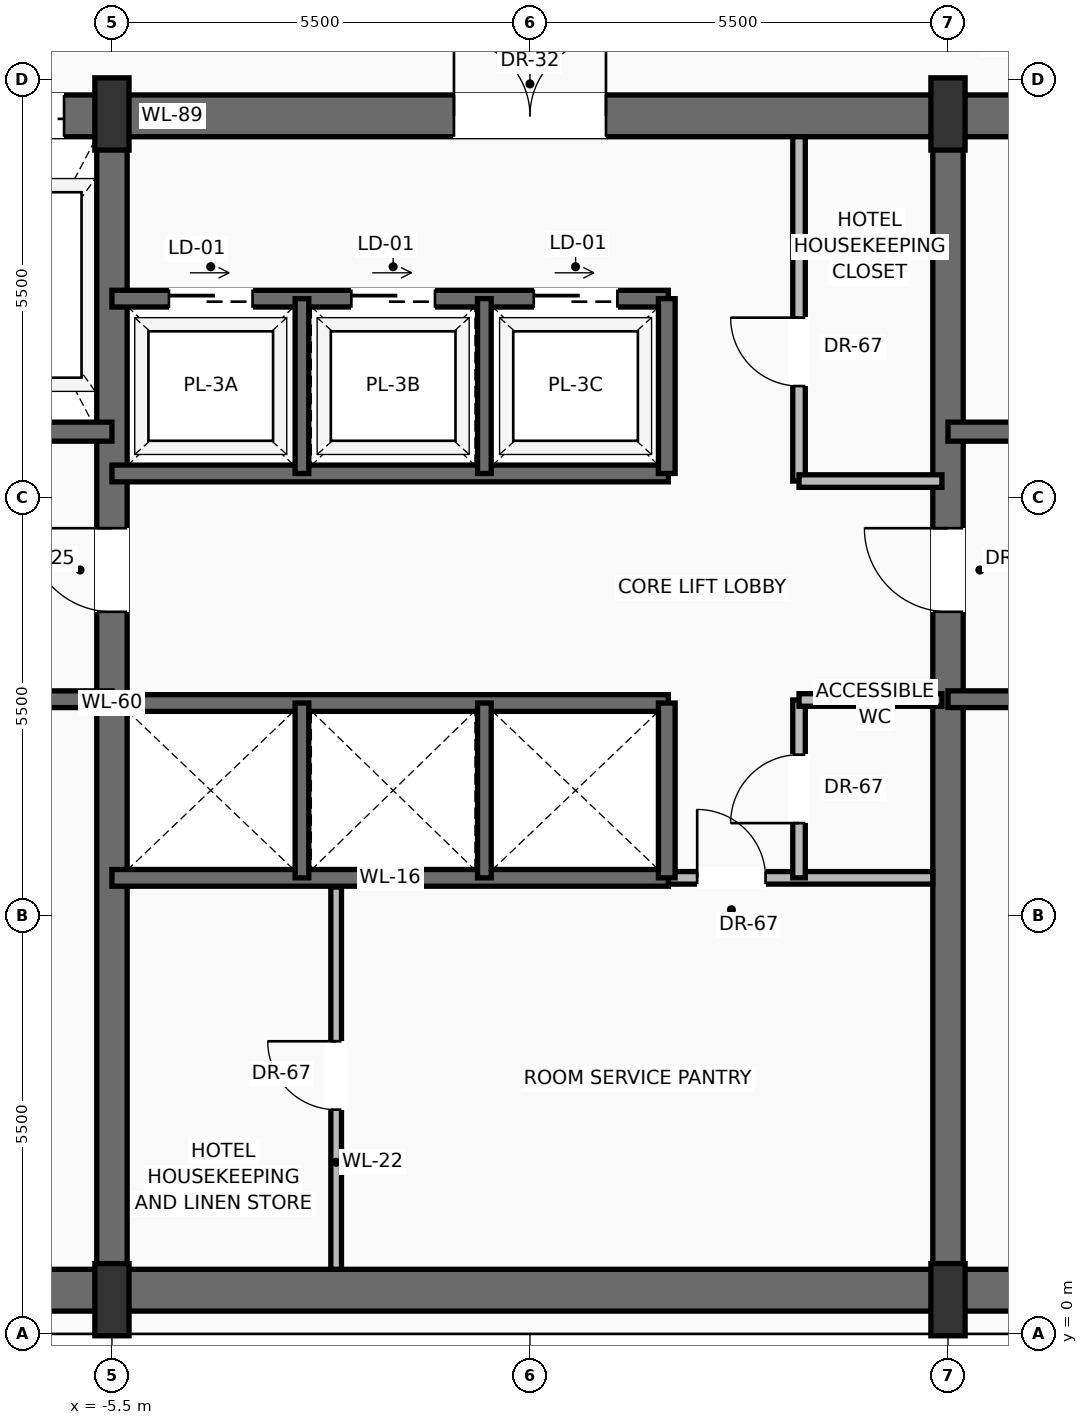
"""IFC4 building model, lengths in metres.
Left out: names, types, materials, properties, quantities, classifications, styles, units other than length and angle.
Written with IfcOpenShell. Run it as: python <this file> out.ifc"""

import sys

from ifc_helpers import new_model, si_unit, direction, frame, frame_2d, origin, origin_2d, place, context, subcontext, project, spatial, rectangle, extrude, source, transform, mapped, element, fill, save


model = new_model("IFC4")
c1 = context("Model", 3, precision=1e-05, world=origin(), true_north=direction((0.0, 1.0)))
c2 = subcontext(c1, "Body", "Model", "MODEL_VIEW")
j1 = project(units=[si_unit("LENGTHUNIT", "METRE"), si_unit("PLANEANGLEUNIT", "RADIAN")], contexts=[c1])
p1 = place(None, origin())
s1 = spatial("IfcSite", under=j1, at=p1, CompositionType="ELEMENT")
p2 = place(p1, origin())
s2 = spatial("IfcBuilding", under=s1, at=p2, CompositionType="ELEMENT")
p3 = place(p2, frame((0.0, 0.0, 220.0)))
s3 = spatial("IfcBuildingStorey", under=s2, at=p3, CompositionType="ELEMENT", Elevation=220.0)
p4 = place(p3, frame((-10.65, 0.575, 0.0), z_axis=(0.0, 0.0, 1.0), x_axis=(1.0, 0.0, 0.0)))
e1 = element("IfcWall", 1, at=p4, inside=s3, PredefinedType="SHEAR", context=c2, shape_type="SweptSolid", body=[
    extrude(rectangle(XDim=21.3, YDim=0.55, at=frame_2d((10.65, 0.0))), origin(), (0.0, 0.0, 1.0), 3.24),
])
p5 = place(p3, frame((-10.7, 16.025, 0.0), z_axis=(0.0, 0.0, 1.0), x_axis=(1.0, 0.0, 0.0)))
e2 = element("IfcWall", 2, at=p5, inside=s3, PredefinedType="SHEAR", context=c2, shape_type="SweptSolid", body=[
    extrude(rectangle(XDim=21.4, YDim=0.55, at=frame_2d((10.7, 0.0))), origin(), (0.0, 0.0, 1.0), 3.24),
])
p6 = place(p5, frame((3.27, 0.0, 0.0)))
e3 = element("IfcOpeningElement", 3, at=p6, cuts=e2, PredefinedType="OPENING", context=c2, shape_type="SweptSolid", body=[
    extrude(rectangle(XDim=1.3, YDim=2.3, at=frame_2d((0.65, 1.15))), frame((0.0, 0.285, 0.0), z_axis=(0.0, -1.0, 0.0), x_axis=(1.0, 0.0, 0.0)), (0.0, 0.0, 1.0), 0.57),
])
p7 = place(p5, frame((9.7, 0.0, 0.0)))
e4 = element("IfcOpeningElement", 4, at=p7, cuts=e2, PredefinedType="OPENING", context=c2, shape_type="SweptSolid", body=[
    extrude(rectangle(XDim=2.0, YDim=2.4, at=frame_2d((1.0, 1.2))), frame((0.0, 0.285, 0.0), z_axis=(0.0, -1.0, 0.0), x_axis=(1.0, 0.0, 0.0)), (0.0, 0.0, 1.0), 0.57),
])
p8 = place(p3, frame((-5.5, 0.575, 0.0), z_axis=(0.0, 0.0, 1.0), x_axis=(0.0, 1.0, 0.0)))
e5 = element("IfcWall", 5, at=p8, inside=s3, PredefinedType="SHEAR", context=c2, shape_type="SweptSolid", body=[
    extrude(rectangle(XDim=15.45, YDim=0.4, at=frame_2d((7.725, 0.0))), origin(), (0.0, 0.0, 1.0), 3.24),
])
p9 = place(p8, frame((8.925, 0.0, 0.0)))
e6 = element("IfcOpeningElement", 6, at=p9, cuts=e5, PredefinedType="OPENING", context=c2, shape_type="SweptSolid", body=[
    extrude(rectangle(XDim=1.1, YDim=2.2, at=frame_2d((0.55, 1.1))), frame((0.0, 0.21, 0.0), z_axis=(0.0, -1.0, 0.0), x_axis=(1.0, 0.0, 0.0)), (0.0, 0.0, 1.0), 0.42),
])
p10 = place(p3, frame((5.5, 0.575, 0.0), z_axis=(0.0, 0.0, 1.0), x_axis=(0.0, 1.0, 0.0)))
e7 = element("IfcWall", 7, at=p10, inside=s3, PredefinedType="SHEAR", context=c2, shape_type="SweptSolid", body=[
    extrude(rectangle(XDim=15.45, YDim=0.4, at=frame_2d((7.725, 0.0))), origin(), (0.0, 0.0, 1.0), 3.24),
])
p11 = place(p10, frame((8.925, 0.0, 0.0)))
e8 = element("IfcOpeningElement", 8, at=p11, cuts=e7, PredefinedType="OPENING", context=c2, shape_type="SweptSolid", body=[
    extrude(rectangle(XDim=1.1, YDim=2.2, at=frame_2d((0.55, 1.1))), frame((0.0, 0.21, 0.0), z_axis=(0.0, -1.0, 0.0), x_axis=(1.0, 0.0, 0.0)), (0.0, 0.0, 1.0), 0.42),
])
m1 = source(origin(), c2, "Body", "SweptSolid", [
    extrude(rectangle(XDim=0.45, YDim=0.95, at=origin_2d()), origin(), (0.0, 0.0, 1.0), 3.45),
])
for number, where, z_axis, x_axis in (
    (9, (-5.5, 0.45, 0.0), (0.0, 0.0, 1.0), (1.0, 0.0, 0.0)),
    (10, (5.5, 0.45, 0.0), (0.0, 0.0, 1.0), (1.0, 0.0, 0.0)),
    (11, (-5.5, 16.05, 0.0), (0.0, 0.0, 1.0), (1.0, 0.0, 0.0)),
    (12, (5.5, 16.05, 0.0), (0.0, 0.0, 1.0), (1.0, 0.0, 0.0)),
):
    element("IfcColumn", number, at=place(p3, frame(where, z_axis=z_axis, x_axis=x_axis)), inside=s3, PredefinedType="PILASTER", context=c2, shape_type="MappedRepresentation", body=[
        mapped(m1, transform((0.0, 0.0, 0.0), scale=1.0)),
    ])
p12 = place(p3, frame((-5.5, 8.35, 0.0), z_axis=(0.0, 0.0, 1.0), x_axis=(-1.0, 0.0, 0.0)))
e13 = element("IfcWall", 13, at=p12, inside=s3, PredefinedType="SOLIDWALL", context=c2, shape_type="SweptSolid", body=[
    extrude(rectangle(XDim=4.65, YDim=0.22, at=frame_2d((2.325, 0.0))), origin(), (0.0, 0.0, 1.0), 3.24),
])
p13 = place(p12, frame((2.5, 0.0, 0.0)))
e14 = element("IfcOpeningElement", 14, at=p13, cuts=e13, PredefinedType="OPENING", context=c2, shape_type="SweptSolid", body=[
    extrude(rectangle(XDim=1.15, YDim=2.2, at=frame_2d((0.575, 1.1))), frame((0.0, 0.12, 0.0), z_axis=(0.0, -1.0, 0.0), x_axis=(1.0, 0.0, 0.0)), (0.0, 0.0, 1.0), 0.24),
])
p14 = place(p3, frame((-5.5, 11.87, 0.0), z_axis=(0.0, 0.0, 1.0), x_axis=(-1.0, 0.0, 0.0)))
e15 = element("IfcWall", 15, at=p14, inside=s3, PredefinedType="SOLIDWALL", context=c2, shape_type="SweptSolid", body=[
    extrude(rectangle(XDim=4.65, YDim=0.25, at=frame_2d((2.325, 0.0))), origin(), (0.0, 0.0, 1.0), 3.24),
])
p15 = place(p14, frame((2.95, 0.0, 0.0)))
e16 = element("IfcOpeningElement", 16, at=p15, cuts=e15, PredefinedType="OPENING", context=c2, shape_type="SweptSolid", body=[
    extrude(rectangle(XDim=1.2, YDim=2.25, at=frame_2d((0.6, 1.125))), frame((0.0, 0.135, 0.0), z_axis=(0.0, -1.0, 0.0), x_axis=(1.0, 0.0, 0.0)), (0.0, 0.0, 1.0), 0.27),
])
p16 = place(p3, frame((10.15, 8.35, 0.0), z_axis=(0.0, 0.0, 1.0), x_axis=(-1.0, 0.0, 0.0)))
e17 = element("IfcWall", 17, at=p16, inside=s3, PredefinedType="SOLIDWALL", context=c2, shape_type="SweptSolid", body=[
    extrude(rectangle(XDim=4.65, YDim=0.22, at=frame_2d((2.325, 0.0))), origin(), (0.0, 0.0, 1.0), 3.24),
])
p17 = place(p16, frame((1.0, 0.0, 0.0)))
e18 = element("IfcOpeningElement", 18, at=p17, cuts=e17, PredefinedType="OPENING", context=c2, shape_type="SweptSolid", body=[
    extrude(rectangle(XDim=1.15, YDim=2.2, at=frame_2d((0.575, 1.1))), frame((0.0, 0.12, 0.0), z_axis=(0.0, -1.0, 0.0), x_axis=(1.0, 0.0, 0.0)), (0.0, 0.0, 1.0), 0.24),
])
p18 = place(p3, frame((10.15, 11.87, 0.0), z_axis=(0.0, 0.0, 1.0), x_axis=(-1.0, 0.0, 0.0)))
e19 = element("IfcWall", 19, at=p18, inside=s3, PredefinedType="SOLIDWALL", context=c2, shape_type="SweptSolid", body=[
    extrude(rectangle(XDim=4.65, YDim=0.25, at=frame_2d((2.325, 0.0))), origin(), (0.0, 0.0, 1.0), 3.24),
])
p19 = place(p18, frame((0.5, 0.0, 0.0)))
e20 = element("IfcOpeningElement", 20, at=p19, cuts=e19, PredefinedType="OPENING", context=c2, shape_type="SweptSolid", body=[
    extrude(rectangle(XDim=1.2, YDim=2.25, at=frame_2d((0.6, 1.125))), frame((0.0, 0.135, 0.0), z_axis=(0.0, -1.0, 0.0), x_axis=(1.0, 0.0, 0.0)), (0.0, 0.0, 1.0), 0.27),
])
p20 = place(p3, frame((1.82, 6.0, 0.0), z_axis=(0.0, 0.0, 1.0), x_axis=(1.0, 0.0, 0.0)))
e21 = element("IfcWall", 21, at=p20, inside=s3, PredefinedType="PARTITIONING", context=c2, shape_type="SweptSolid", body=[
    extrude(rectangle(XDim=3.48, YDim=0.165, at=frame_2d((1.74, 0.0))), origin(), (0.0, 0.0, 1.0), 3.232),
])
p21 = place(p20, frame((0.38, 0.0, 0.0)))
e22 = element("IfcOpeningElement", 22, at=p21, cuts=e21, PredefinedType="OPENING", context=c2, shape_type="SweptSolid", body=[
    extrude(rectangle(XDim=0.9, YDim=2.1, at=frame_2d((0.45, 1.05))), frame((0.0, 0.093, 0.0), z_axis=(0.0, -1.0, 0.0), x_axis=(1.0, 0.0, 0.0)), (0.0, 0.0, 1.0), 0.185),
])
p22 = place(p3, frame((-2.55, 0.85, 0.0), z_axis=(0.0, 0.0, 1.0), x_axis=(0.0, 1.0, 0.0)))
e23 = element("IfcWall", 23, at=p22, inside=s3, PredefinedType="PARTITIONING", context=c2, shape_type="SweptSolid", body=[
    extrude(rectangle(XDim=5.03, YDim=0.14, at=frame_2d((2.515, 0.0))), origin(), (0.0, 0.0, 1.0), 3.232),
])
p23 = place(p22, frame((2.1, 0.0, 0.0)))
e24 = element("IfcOpeningElement", 24, at=p23, cuts=e23, PredefinedType="OPENING", context=c2, shape_type="SweptSolid", body=[
    extrude(rectangle(XDim=0.9, YDim=2.1, at=frame_2d((0.45, 1.05))), frame((0.0, 0.08, 0.0), z_axis=(0.0, -1.0, 0.0), x_axis=(1.0, 0.0, 0.0)), (0.0, 0.0, 1.0), 0.16),
])
p24 = place(p3, frame((3.54, 6.0, 0.0), z_axis=(0.0, 0.0, 1.0), x_axis=(0.0, 1.0, 0.0)))
e25 = element("IfcWall", 25, at=p24, inside=s3, PredefinedType="PARTITIONING", context=c2, shape_type="SweptSolid", body=[
    extrude(rectangle(XDim=2.34, YDim=0.165, at=frame_2d((1.17, 0.0))), origin(), (0.0, 0.0, 1.0), 3.232),
])
p25 = place(p24, frame((0.72, 0.0, 0.0)))
e26 = element("IfcOpeningElement", 26, at=p25, cuts=e25, PredefinedType="OPENING", context=c2, shape_type="SweptSolid", body=[
    extrude(rectangle(XDim=0.9, YDim=2.1, at=frame_2d((0.45, 1.05))), frame((0.0, 0.093, 0.0), z_axis=(0.0, -1.0, 0.0), x_axis=(1.0, 0.0, 0.0)), (0.0, 0.0, 1.0), 0.185),
])
p26 = place(p3, frame((3.54, 8.34, 0.0), z_axis=(0.0, 0.0, 1.0), x_axis=(1.0, 0.0, 0.0)))
e27 = element("IfcWall", 27, at=p26, inside=s3, PredefinedType="PARTITIONING", context=c2, shape_type="SweptSolid", body=[
    extrude(rectangle(XDim=1.88, YDim=0.165, at=frame_2d((0.94, 0.0))), origin(), (0.0, 0.0, 1.0), 3.232),
])
for number, where, z_axis, x_axis in (
    (28, (-5.5, 6.0, 0.0), (0.0, 0.0, 1.0), (1.0, 0.0, 0.0)),
    (29, (-5.5, 8.3, 0.0), (0.0, 0.0, 1.0), (1.0, 0.0, 0.0)),
):
    element("IfcWall", number, at=place(p3, frame(where, z_axis=z_axis, x_axis=x_axis)), inside=s3, PredefinedType="SOLIDWALL", context=c2, shape_type="SweptSolid", body=[
        extrude(rectangle(XDim=7.32, YDim=0.22, at=frame_2d((3.66, 0.0))), origin(), (0.0, 0.0, 1.0), 3.24),
    ])
p27 = place(p3, frame((1.8, 6.0, 0.0), z_axis=(0.0, 0.0, 1.0), x_axis=(0.0, 1.0, 0.0)))
e30 = element("IfcWall", 30, at=p27, inside=s3, PredefinedType="SOLIDWALL", context=c2, shape_type="SweptSolid", body=[
    extrude(rectangle(XDim=2.3, YDim=0.22, at=frame_2d((1.15, 0.0))), origin(), (0.0, 0.0, 1.0), 3.24),
])
for number, where, z_axis, x_axis in (
    (31, (-3.0, 6.0, 0.0), (0.0, 0.0, 1.0), (0.0, 1.0, 0.0)),
    (32, (-0.6, 6.0, 0.0), (0.0, 0.0, 1.0), (0.0, 1.0, 0.0)),
):
    element("IfcWall", number, at=place(p3, frame(where, z_axis=z_axis, x_axis=x_axis)), inside=s3, PredefinedType="SOLIDWALL", context=c2, shape_type="SweptSolid", body=[
        extrude(rectangle(XDim=2.3, YDim=0.18, at=frame_2d((1.15, 0.0))), origin(), (0.0, 0.0, 1.0), 3.24),
    ])
p28 = place(p3, frame((-5.5, 11.32, 0.0), z_axis=(0.0, 0.0, 1.0), x_axis=(1.0, 0.0, 0.0)))
e33 = element("IfcWall", 33, at=p28, inside=s3, PredefinedType="SOLIDWALL", context=c2, shape_type="SweptSolid", body=[
    extrude(rectangle(XDim=7.32, YDim=0.22, at=frame_2d((3.66, 0.0))), origin(), (0.0, 0.0, 1.0), 3.24),
])
p29 = place(p3, frame((-5.5, 13.62, 0.0), z_axis=(0.0, 0.0, 1.0), x_axis=(1.0, 0.0, 0.0)))
e34 = element("IfcWall", 34, at=p29, inside=s3, PredefinedType="SOLIDWALL", context=c2, shape_type="SweptSolid", body=[
    extrude(rectangle(XDim=7.32, YDim=0.22, at=frame_2d((3.66, 0.0))), origin(), (0.0, 0.0, 1.0), 3.24),
])
p30 = place(p29, frame((0.75, 0.0, 0.0)))
e35 = element("IfcOpeningElement", 35, at=p30, cuts=e34, PredefinedType="OPENING", context=c2, shape_type="SweptSolid", body=[
    extrude(rectangle(XDim=1.1, YDim=2.2, at=frame_2d((0.55, 1.1))), frame((0.0, 0.12, 0.0), z_axis=(0.0, -1.0, 0.0), x_axis=(1.0, 0.0, 0.0)), (0.0, 0.0, 1.0), 0.24),
])
p31 = place(p29, frame((3.15, 0.0, 0.0)))
e36 = element("IfcOpeningElement", 36, at=p31, cuts=e34, PredefinedType="OPENING", context=c2, shape_type="SweptSolid", body=[
    extrude(rectangle(XDim=1.1, YDim=2.2, at=frame_2d((0.55, 1.1))), frame((0.0, 0.12, 0.0), z_axis=(0.0, -1.0, 0.0), x_axis=(1.0, 0.0, 0.0)), (0.0, 0.0, 1.0), 0.24),
])
p32 = place(p29, frame((5.55, 0.0, 0.0)))
e37 = element("IfcOpeningElement", 37, at=p32, cuts=e34, PredefinedType="OPENING", context=c2, shape_type="SweptSolid", body=[
    extrude(rectangle(XDim=1.1, YDim=2.2, at=frame_2d((0.55, 1.1))), frame((0.0, 0.12, 0.0), z_axis=(0.0, -1.0, 0.0), x_axis=(1.0, 0.0, 0.0)), (0.0, 0.0, 1.0), 0.24),
])
p33 = place(p3, frame((1.8, 11.32, 0.0), z_axis=(0.0, 0.0, 1.0), x_axis=(0.0, 1.0, 0.0)))
e38 = element("IfcWall", 38, at=p33, inside=s3, PredefinedType="SOLIDWALL", context=c2, shape_type="SweptSolid", body=[
    extrude(rectangle(XDim=2.3, YDim=0.22, at=frame_2d((1.15, 0.0))), origin(), (0.0, 0.0, 1.0), 3.24),
])
for number, where, z_axis, x_axis in (
    (39, (-3.0, 11.32, 0.0), (0.0, 0.0, 1.0), (0.0, 1.0, 0.0)),
    (40, (-0.6, 11.32, 0.0), (0.0, 0.0, 1.0), (0.0, 1.0, 0.0)),
):
    element("IfcWall", number, at=place(p3, frame(where, z_axis=z_axis, x_axis=x_axis)), inside=s3, PredefinedType="SOLIDWALL", context=c2, shape_type="SweptSolid", body=[
        extrude(rectangle(XDim=2.3, YDim=0.18, at=frame_2d((1.15, 0.0))), origin(), (0.0, 0.0, 1.0), 3.24),
    ])
p34 = place(p3, frame((3.54, 11.22, 0.0), z_axis=(0.0, 0.0, 1.0), x_axis=(0.0, 1.0, 0.0)))
e41 = element("IfcWall", 41, at=p34, inside=s3, PredefinedType="PARTITIONING", context=c2, shape_type="SweptSolid", body=[
    extrude(rectangle(XDim=4.53, YDim=0.165, at=frame_2d((2.265, 0.0))), origin(), (0.0, 0.0, 1.0), 3.232),
])
p35 = place(p34, frame((1.25, 0.0, 0.0)))
e42 = element("IfcOpeningElement", 42, at=p35, cuts=e41, PredefinedType="OPENING", context=c2, shape_type="SweptSolid", body=[
    extrude(rectangle(XDim=0.9, YDim=2.1, at=frame_2d((0.45, 1.05))), frame((0.0, 0.093, 0.0), z_axis=(0.0, -1.0, 0.0), x_axis=(1.0, 0.0, 0.0)), (0.0, 0.0, 1.0), 0.185),
])
p36 = place(p3, frame((3.54, 11.22, 0.0), z_axis=(0.0, 0.0, 1.0), x_axis=(1.0, 0.0, 0.0)))
e43 = element("IfcWall", 43, at=p36, inside=s3, PredefinedType="PARTITIONING", context=c2, shape_type="SweptSolid", body=[
    extrude(rectangle(XDim=1.88, YDim=0.165, at=frame_2d((0.94, 0.0))), origin(), (0.0, 0.0, 1.0), 3.232),
])
m2 = source(origin(), c2, "Body", "SweptSolid", [
    extrude(rectangle(XDim=1.1, YDim=2.2, at=frame_2d((0.55, 1.1))), frame((0.0, 0.025, 0.0), z_axis=(0.0, -1.0, 0.0), x_axis=(1.0, 0.0, 0.0)), (0.0, 0.0, 1.0), 0.05),
])
p37 = place(p9, origin())
e44 = element("IfcDoor", 44, at=p37, inside=s3, OperationType="SINGLE_SWING_RIGHT", PredefinedType="DOOR", context=c2, shape_type="MappedRepresentation", body=[
    mapped(m2, transform((0.0, 0.0, 0.0), scale=1.0)),
])
fill(e6, e44)
m3 = source(origin(), c2, "Body", "SweptSolid", [
    extrude(rectangle(XDim=1.3, YDim=2.3, at=frame_2d((0.65, 1.15))), frame((0.0, 0.025, 0.0), z_axis=(0.0, -1.0, 0.0), x_axis=(1.0, 0.0, 0.0)), (0.0, 0.0, 1.0), 0.05),
])
p38 = place(p6, origin())
e45 = element("IfcDoor", 45, at=p38, inside=s3, OperationType="SLIDING_TO_RIGHT", PredefinedType="DOOR", context=c2, shape_type="MappedRepresentation", body=[
    mapped(m3, transform((0.0, 0.0, 0.0), scale=1.0)),
])
fill(e3, e45)
p39 = place(p11, origin())
e46 = element("IfcDoor", 46, at=p39, inside=s3, OperationType="SINGLE_SWING_RIGHT", PredefinedType="DOOR", context=c2, shape_type="MappedRepresentation", body=[
    mapped(m2, transform((0.0, 0.0, 0.0), scale=1.0)),
])
fill(e8, e46)
m4 = source(origin(), c2, "Body", "SweptSolid", [
    extrude(rectangle(XDim=2.0, YDim=2.4, at=frame_2d((1.0, 1.2))), frame((0.0, 0.025, 0.0), z_axis=(0.0, -1.0, 0.0), x_axis=(1.0, 0.0, 0.0)), (0.0, 0.0, 1.0), 0.05),
])
p40 = place(p7, origin())
e47 = element("IfcDoor", 47, at=p40, inside=s3, OperationType="DOUBLE_DOOR_SINGLE_SWING", PredefinedType="DOOR", context=c2, shape_type="MappedRepresentation", body=[
    mapped(m4, transform((0.0, 0.0, 0.0), scale=1.0)),
])
fill(e4, e47)
m5 = source(origin(), c2, "Body", "SweptSolid", [
    extrude(rectangle(XDim=0.9, YDim=2.1, at=frame_2d((0.45, 1.05))), frame((0.0, 0.025, 0.0), z_axis=(0.0, -1.0, 0.0), x_axis=(1.0, 0.0, 0.0)), (0.0, 0.0, 1.0), 0.05),
])
p41 = place(p21, origin())
e48 = element("IfcDoor", 48, at=p41, inside=s3, OperationType="SINGLE_SWING_LEFT", PredefinedType="DOOR", context=c2, shape_type="MappedRepresentation", body=[
    mapped(m5, transform((0.0, 0.0, 0.0), scale=1.0)),
])
fill(e22, e48)
p42 = place(p23, origin())
e49 = element("IfcDoor", 49, at=p42, inside=s3, OperationType="SINGLE_SWING_RIGHT", PredefinedType="DOOR", context=c2, shape_type="MappedRepresentation", body=[
    mapped(m5, transform((0.0, 0.0, 0.0), scale=1.0)),
])
fill(e24, e49)
p43 = place(p25, origin())
e50 = element("IfcDoor", 50, at=p43, inside=s3, OperationType="SINGLE_SWING_LEFT", PredefinedType="DOOR", context=c2, shape_type="MappedRepresentation", body=[
    mapped(m5, transform((0.0, 0.0, 0.0), scale=1.0)),
])
fill(e26, e50)
m6 = source(origin(), c2, "Body", "SweptSolid", [
    extrude(rectangle(XDim=1.1, YDim=2.2, at=frame_2d((0.55, 1.1))), frame((0.0, 0.025, 0.0), z_axis=(0.0, -1.0, 0.0), x_axis=(1.0, 0.0, 0.0)), (0.0, 0.0, 1.0), 0.05),
])
p44 = place(p30, origin())
e51 = element("IfcDoor", 51, at=p44, inside=s3, OperationType="SLIDING_TO_RIGHT", PredefinedType="DOOR", context=c2, shape_type="MappedRepresentation", body=[
    mapped(m6, transform((0.0, 0.0, 0.0), scale=1.0)),
])
fill(e35, e51)
p45 = place(p31, origin())
e52 = element("IfcDoor", 52, at=p45, inside=s3, OperationType="SLIDING_TO_RIGHT", PredefinedType="DOOR", context=c2, shape_type="MappedRepresentation", body=[
    mapped(m6, transform((0.0, 0.0, 0.0), scale=1.0)),
])
fill(e36, e52)
p46 = place(p32, origin())
e53 = element("IfcDoor", 53, at=p46, inside=s3, OperationType="SLIDING_TO_RIGHT", PredefinedType="DOOR", context=c2, shape_type="MappedRepresentation", body=[
    mapped(m6, transform((0.0, 0.0, 0.0), scale=1.0)),
])
fill(e37, e53)
p47 = place(p35, origin())
e54 = element("IfcDoor", 54, at=p47, inside=s3, OperationType="SINGLE_SWING_RIGHT", PredefinedType="DOOR", context=c2, shape_type="MappedRepresentation", body=[
    mapped(m5, transform((0.0, 0.0, 0.0), scale=1.0)),
])
fill(e42, e54)
save(model, sys.argv[1])
